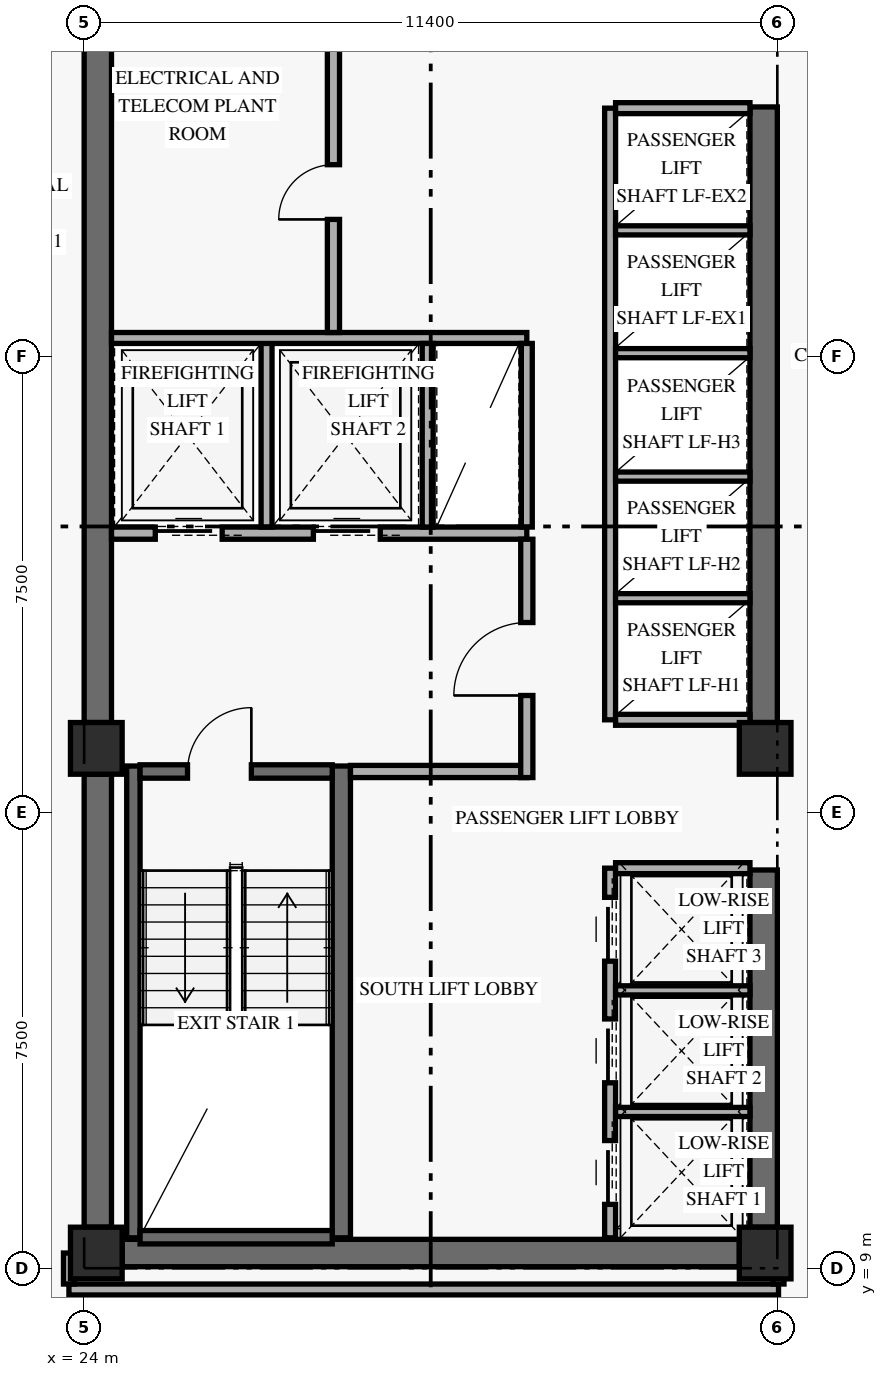
"""IFC4 building model, lengths in metres.
Left out: names, types, materials, properties, quantities, classifications, styles, units other than length and angle.
Written with IfcOpenShell. Run it as: python <this file> out.ifc"""

import sys

from ifc_helpers import new_model, si_unit, direction, frame, frame_2d, origin, origin_2d, place, context, subcontext, project, spatial, rectangle, extrude, element, fill, save


model = new_model("IFC4")
c1 = context("Model", 3, precision=1e-05, world=origin(), true_north=direction((0.0, 1.0)))
c2 = subcontext(c1, "Body", "Model", "MODEL_VIEW")
j1 = project(units=[si_unit("LENGTHUNIT", "METRE"), si_unit("PLANEANGLEUNIT", "RADIAN")], contexts=[c1])
p1 = place(None, origin())
s1 = spatial("IfcSite", under=j1, at=p1, CompositionType="ELEMENT")
p2 = place(p1, origin())
s2 = spatial("IfcBuilding", under=s1, at=p2, CompositionType="ELEMENT")
p3 = place(p2, frame((0.0, 0.0, 56.4)))
s3 = spatial("IfcBuildingStorey", under=s2, at=p3, CompositionType="ELEMENT", Elevation=56.4)
p4 = place(p3, frame((24.225, 9.675, 0.0), z_axis=(0.0, 0.0, 1.0), x_axis=(0.0, 1.0, 0.0)))
e1 = element("IfcWall", 1, at=p4, inside=s3, PredefinedType="SHEAR", context=c2, shape_type="SweptSolid", body=[
    extrude(rectangle(XDim=7.45, YDim=0.45, at=frame_2d((3.725, 0.0))), origin(), (0.0, 0.0, 1.0), 2.657),
])
p5 = place(p3, frame((24.225, 17.975, 0.0), z_axis=(0.0, 0.0, 1.0), x_axis=(0.0, 1.0, 0.0)))
e2 = element("IfcWall", 2, at=p5, inside=s3, PredefinedType="SHEAR", context=c2, shape_type="SweptSolid", body=[
    extrude(rectangle(XDim=11.8, YDim=0.45, at=frame_2d((5.9, 0.0))), origin(), (0.0, 0.0, 1.0), 2.657),
])
p6 = place(p3, frame((35.175, 9.675, 0.0), z_axis=(0.0, 0.0, 1.0), x_axis=(0.0, 1.0, 0.0)))
e3 = element("IfcWall", 3, at=p6, inside=s3, PredefinedType="SHEAR", context=c2, shape_type="SweptSolid", body=[
    extrude(rectangle(XDim=5.875, YDim=0.45, at=frame_2d((2.938, 0.0))), origin(), (0.0, 0.0, 1.0), 2.657),
])
p7 = place(p3, frame((35.175, 17.975, 0.0), z_axis=(0.0, 0.0, 1.0), x_axis=(0.0, 1.0, 0.0)))
e4 = element("IfcWall", 4, at=p7, inside=s3, PredefinedType="SHEAR", context=c2, shape_type="SweptSolid", body=[
    extrude(rectangle(XDim=10.125, YDim=0.45, at=frame_2d((5.062, 0.0))), origin(), (0.0, 0.0, 1.0), 2.657),
])
p8 = place(p3, frame((24.625, 9.25, 0.0), z_axis=(0.0, 0.0, 1.0), x_axis=(1.0, 0.0, 0.0)))
e5 = element("IfcWall", 5, at=p8, inside=s3, PredefinedType="SHEAR", context=c2, shape_type="SweptSolid", body=[
    extrude(rectangle(XDim=10.15, YDim=0.45, at=frame_2d((5.075, 0.0))), origin(), (0.0, 0.0, 1.0), 3.35),
])
p9 = place(p3, frame((24.81, 9.5, 0.0), z_axis=(0.0, 0.0, 1.0), x_axis=(0.0, 1.0, 0.0)))
e6 = element("IfcWall", 6, at=p9, inside=s3, PredefinedType="SHEAR", context=c2, shape_type="SweptSolid", body=[
    extrude(rectangle(XDim=7.76, YDim=0.22, at=frame_2d((3.88, 0.0))), origin(), (0.0, 0.0, 1.0), 3.35),
])
p10 = place(p3, frame((28.23, 9.5, 0.0), z_axis=(0.0, 0.0, 1.0), x_axis=(0.0, 1.0, 0.0)))
e7 = element("IfcWall", 7, at=p10, inside=s3, PredefinedType="SHEAR", context=c2, shape_type="SweptSolid", body=[
    extrude(rectangle(XDim=7.76, YDim=0.3, at=frame_2d((3.88, 0.0))), origin(), (0.0, 0.0, 1.0), 3.35),
])
p11 = place(p3, frame((24.92, 9.51, 0.0), z_axis=(0.0, 0.0, 1.0), x_axis=(1.0, 0.0, 0.0)))
e8 = element("IfcWall", 8, at=p11, inside=s3, PredefinedType="SHEAR", context=c2, shape_type="SweptSolid", body=[
    extrude(rectangle(XDim=3.16, YDim=0.22, at=frame_2d((1.58, 0.0))), origin(), (0.0, 0.0, 1.0), 3.35),
])
p12 = place(p3, frame((24.92, 17.17, 0.0), z_axis=(0.0, 0.0, 1.0), x_axis=(1.0, 0.0, 0.0)))
e9 = element("IfcWall", 9, at=p12, inside=s3, PredefinedType="SHEAR", context=c2, shape_type="SweptSolid", body=[
    extrude(rectangle(XDim=3.16, YDim=0.22, at=frame_2d((1.58, 0.0))), origin(), (0.0, 0.0, 1.0), 3.35),
])
p13 = place(p12, frame((0.78, 0.0, 0.0)))
e10 = element("IfcOpeningElement", 10, at=p13, cuts=e9, PredefinedType="OPENING", context=c2, shape_type="SweptSolid", body=[
    extrude(rectangle(XDim=1.05, YDim=2.15, at=frame_2d((0.525, 1.075))), frame((0.0, 0.12, 0.0), z_axis=(0.0, -1.0, 0.0), x_axis=(1.0, 0.0, 0.0)), (0.0, 0.0, 1.0), 0.24),
])
for number, where, z_axis, x_axis in (
    (11, (24.2, 9.25, 0.0), (0.0, 0.0, 1.0), (1.0, 0.0, 0.0)),
    (12, (24.2, 17.55, 0.0), (0.0, 0.0, 1.0), (1.0, 0.0, 0.0)),
    (13, (35.2, 9.25, 0.0), (0.0, 0.0, 1.0), (1.0, 0.0, 0.0)),
    (14, (35.2, 17.55, 0.0), (0.0, 0.0, 1.0), (1.0, 0.0, 0.0)),
):
    element("IfcColumn", number, at=place(p3, frame(where, z_axis=z_axis, x_axis=x_axis)), inside=s3, PredefinedType="COLUMN", context=c2, shape_type="SweptSolid", body=[
        extrude(rectangle(XDim=0.85, YDim=0.85, at=origin_2d()), origin(), (0.0, 0.0, 1.0), 3.6),
    ])
p14 = place(p3, frame((24.45, 21.09, 0.0), z_axis=(0.0, 0.0, 1.0), x_axis=(1.0, 0.0, 0.0)))
e15 = element("IfcWall", 15, at=p14, inside=s3, PredefinedType="STANDARD", context=c2, shape_type="SweptSolid", body=[
    extrude(rectangle(XDim=6.83, YDim=0.2, at=frame_2d((3.415, 0.0))), origin(), (0.0, 0.0, 1.0), 3.35),
])
p15 = place(p14, frame((0.72, 0.0, 0.0)))
e16 = element("IfcOpeningElement", 16, at=p15, cuts=e15, PredefinedType="OPENING", context=c2, shape_type="SweptSolid", body=[
    extrude(rectangle(XDim=1.1, YDim=2.2, at=frame_2d((0.55, 1.1))), frame((0.0, 0.11, 0.0), z_axis=(0.0, -1.0, 0.0), x_axis=(1.0, 0.0, 0.0)), (0.0, 0.0, 1.0), 0.22),
])
p16 = place(p14, frame((3.32, 0.0, 0.0)))
e17 = element("IfcOpeningElement", 17, at=p16, cuts=e15, PredefinedType="OPENING", context=c2, shape_type="SweptSolid", body=[
    extrude(rectangle(XDim=1.1, YDim=2.2, at=frame_2d((0.55, 1.1))), frame((0.0, 0.11, 0.0), z_axis=(0.0, -1.0, 0.0), x_axis=(1.0, 0.0, 0.0)), (0.0, 0.0, 1.0), 0.22),
])
p17 = place(p3, frame((28.38, 17.17, 0.0), z_axis=(0.0, 0.0, 1.0), x_axis=(1.0, 0.0, 0.0)))
e18 = element("IfcWall", 18, at=p17, inside=s3, PredefinedType="STANDARD", context=c2, shape_type="SweptSolid", body=[
    extrude(rectangle(XDim=2.9, YDim=0.2, at=frame_2d((1.45, 0.0))), origin(), (0.0, 0.0, 1.0), 3.35),
])
p18 = place(p3, frame((31.28, 17.07, 0.0), z_axis=(0.0, 0.0, 1.0), x_axis=(0.0, 1.0, 0.0)))
e19 = element("IfcWall", 19, at=p18, inside=s3, PredefinedType="STANDARD", context=c2, shape_type="SweptSolid", body=[
    extrude(rectangle(XDim=3.92, YDim=0.2, at=frame_2d((1.96, 0.0))), origin(), (0.0, 0.0, 1.0), 2.639),
])
p19 = place(p18, frame((1.35, 0.0, 0.0)))
e20 = element("IfcOpeningElement", 20, at=p19, cuts=e19, PredefinedType="OPENING", context=c2, shape_type="SweptSolid", body=[
    extrude(rectangle(XDim=1.2, YDim=2.15, at=frame_2d((0.6, 1.075))), frame((0.0, 0.11, 0.0), z_axis=(0.0, -1.0, 0.0), x_axis=(1.0, 0.0, 0.0)), (0.0, 0.0, 1.0), 0.22),
])
p20 = place(p3, frame((27.0, 21.19, 0.0), z_axis=(0.0, 0.0, 1.0), x_axis=(0.0, 1.0, 0.0)))
e21 = element("IfcWall", 21, at=p20, inside=s3, PredefinedType="STANDARD", context=c2, shape_type="SweptSolid", body=[
    extrude(rectangle(XDim=3.11, YDim=0.18, at=frame_2d((1.555, 0.0))), origin(), (0.0, 0.0, 1.0), 3.35),
])
p21 = place(p3, frame((24.45, 24.3, 0.0), z_axis=(0.0, 0.0, 1.0), x_axis=(1.0, 0.0, 0.0)))
e22 = element("IfcWall", 22, at=p21, inside=s3, PredefinedType="STANDARD", context=c2, shape_type="SweptSolid", body=[
    extrude(rectangle(XDim=6.83, YDim=0.18, at=frame_2d((3.415, 0.0))), origin(), (0.0, 0.0, 1.0), 3.35),
])
for number, where, z_axis, x_axis in (
    (23, (29.65, 21.19, 0.0), (0.0, 0.0, 1.0), (0.0, 1.0, 0.0)),
    (24, (31.28, 21.19, 0.0), (0.0, 0.0, 1.0), (0.0, 1.0, 0.0)),
):
    element("IfcWall", number, at=place(p3, frame(where, z_axis=z_axis, x_axis=x_axis)), inside=s3, PredefinedType="STANDARD", context=c2, shape_type="SweptSolid", body=[
        extrude(rectangle(XDim=3.02, YDim=0.18, at=frame_2d((1.51, 0.0))), origin(), (0.0, 0.0, 1.0), 3.35),
    ])
p22 = place(p3, frame((28.1, 24.39, 0.0), z_axis=(0.0, 0.0, 1.0), x_axis=(0.0, 1.0, 0.0)))
e25 = element("IfcWall", 25, at=p22, inside=s3, PredefinedType="STANDARD", context=c2, shape_type="SweptSolid", body=[
    extrude(rectangle(XDim=4.75, YDim=0.2, at=frame_2d((2.375, 0.0))), origin(), (0.0, 0.0, 1.0), 3.35),
])
p23 = place(p22, frame((1.86, 0.0, 0.0)))
e26 = element("IfcOpeningElement", 26, at=p23, cuts=e25, PredefinedType="OPENING", context=c2, shape_type="SweptSolid", body=[
    extrude(rectangle(XDim=0.9, YDim=2.1, at=frame_2d((0.45, 1.05))), frame((0.0, 0.11, 0.0), z_axis=(0.0, -1.0, 0.0), x_axis=(1.0, 0.0, 0.0)), (0.0, 0.0, 1.0), 0.22),
])
p24 = place(p3, frame((32.65, 9.5, 0.0), z_axis=(0.0, 0.0, 1.0), x_axis=(0.0, 1.0, 0.0)))
e27 = element("IfcWall", 27, at=p24, inside=s3, PredefinedType="STANDARD", context=c2, shape_type="SweptSolid", body=[
    extrude(rectangle(XDim=6.08, YDim=0.18, at=frame_2d((3.04, 0.0))), origin(), (0.0, 0.0, 1.0), 3.35),
])
p25 = place(p24, frame((0.55, 0.0, 0.0)))
e28 = element("IfcOpeningElement", 28, at=p25, cuts=e27, PredefinedType="OPENING", context=c2, shape_type="SweptSolid", body=[
    extrude(rectangle(XDim=1.05, YDim=2.2, at=frame_2d((0.525, 1.1))), frame((0.0, 0.1, 0.0), z_axis=(0.0, -1.0, 0.0), x_axis=(1.0, 0.0, 0.0)), (0.0, 0.0, 1.0), 0.2),
])
p26 = place(p24, frame((2.55, 0.0, 0.0)))
e29 = element("IfcOpeningElement", 29, at=p26, cuts=e27, PredefinedType="OPENING", context=c2, shape_type="SweptSolid", body=[
    extrude(rectangle(XDim=1.05, YDim=2.2, at=frame_2d((0.525, 1.1))), frame((0.0, 0.1, 0.0), z_axis=(0.0, -1.0, 0.0), x_axis=(1.0, 0.0, 0.0)), (0.0, 0.0, 1.0), 0.2),
])
p27 = place(p24, frame((4.55, 0.0, 0.0)))
e30 = element("IfcOpeningElement", 30, at=p27, cuts=e27, PredefinedType="OPENING", context=c2, shape_type="SweptSolid", body=[
    extrude(rectangle(XDim=1.05, YDim=2.2, at=frame_2d((0.525, 1.1))), frame((0.0, 0.1, 0.0), z_axis=(0.0, -1.0, 0.0), x_axis=(1.0, 0.0, 0.0)), (0.0, 0.0, 1.0), 0.2),
])
p28 = place(p3, frame((32.74, 15.58, 0.0), z_axis=(0.0, 0.0, 1.0), x_axis=(1.0, 0.0, 0.0)))
e31 = element("IfcWall", 31, at=p28, inside=s3, PredefinedType="STANDARD", context=c2, shape_type="SweptSolid", body=[
    extrude(rectangle(XDim=2.21, YDim=0.18, at=frame_2d((1.105, 0.0))), origin(), (0.0, 0.0, 1.0), 3.35),
])
for number, where, z_axis, x_axis in (
    (32, (32.74, 11.57, 0.0), (0.0, 0.0, 1.0), (1.0, 0.0, 0.0)),
    (33, (32.74, 13.57, 0.0), (0.0, 0.0, 1.0), (1.0, 0.0, 0.0)),
):
    element("IfcWall", number, at=place(p3, frame(where, z_axis=z_axis, x_axis=x_axis)), inside=s3, PredefinedType="STANDARD", context=c2, shape_type="SweptSolid", body=[
        extrude(rectangle(XDim=2.21, YDim=0.15, at=frame_2d((1.105, 0.0))), origin(), (0.0, 0.0, 1.0), 3.35),
    ])
p29 = place(p3, frame((32.65, 18.02, 0.0), z_axis=(0.0, 0.0, 1.0), x_axis=(0.0, 1.0, 0.0)))
e34 = element("IfcWall", 34, at=p29, inside=s3, PredefinedType="STANDARD", context=c2, shape_type="SweptSolid", body=[
    extrude(rectangle(XDim=10.06, YDim=0.18, at=frame_2d((5.03, 0.0))), origin(), (0.0, 0.0, 1.0), 3.35),
])
for number, where, z_axis, x_axis in (
    (35, (32.74, 18.02, 0.0), (0.0, 0.0, 1.0), (1.0, 0.0, 0.0)),
    (36, (32.74, 28.08, 0.0), (0.0, 0.0, 1.0), (1.0, 0.0, 0.0)),
):
    element("IfcWall", number, at=place(p3, frame(where, z_axis=z_axis, x_axis=x_axis)), inside=s3, PredefinedType="STANDARD", context=c2, shape_type="SweptSolid", body=[
        extrude(rectangle(XDim=2.21, YDim=0.18, at=frame_2d((1.105, 0.0))), origin(), (0.0, 0.0, 1.0), 3.35),
    ])
for number, where, z_axis, x_axis in (
    (37, (32.74, 20.02, 0.0), (0.0, 0.0, 1.0), (1.0, 0.0, 0.0)),
    (38, (32.74, 22.02, 0.0), (0.0, 0.0, 1.0), (1.0, 0.0, 0.0)),
    (39, (32.74, 24.05, 0.0), (0.0, 0.0, 1.0), (1.0, 0.0, 0.0)),
    (40, (32.74, 26.07, 0.0), (0.0, 0.0, 1.0), (1.0, 0.0, 0.0)),
):
    element("IfcWall", number, at=place(p3, frame(where, z_axis=z_axis, x_axis=x_axis)), inside=s3, PredefinedType="STANDARD", context=c2, shape_type="SweptSolid", body=[
        extrude(rectangle(XDim=2.21, YDim=0.15, at=frame_2d((1.105, 0.0))), origin(), (0.0, 0.0, 1.0), 3.35),
    ])
p30 = place(p3, frame((23.75, 8.65, 0.0), z_axis=(0.0, 0.0, 1.0), x_axis=(1.0, 0.0, 0.0)))
e41 = element("IfcWall", 41, at=p30, inside=s3, PredefinedType="STANDARD", context=c2, shape_type="SweptSolid", body=[
    extrude(rectangle(XDim=11.67, YDim=0.18, at=frame_2d((5.835, 0.0))), origin(), (0.0, 0.0, 1.0), 2.639),
])
p31 = place(p3, frame((35.42, 8.74, 0.0), z_axis=(0.0, 0.0, 1.0), x_axis=(0.0, 1.0, 0.0)))
e42 = element("IfcWall", 42, at=p31, inside=s3, PredefinedType="STANDARD", context=c2, shape_type="SweptSolid", body=[
    extrude(rectangle(XDim=0.51, YDim=0.18, at=frame_2d((0.255, 0.0))), origin(), (0.0, 0.0, 1.0), 3.35),
])
p32 = place(p3, frame((23.75, 8.74, 0.0), z_axis=(0.0, 0.0, 1.0), x_axis=(0.0, 1.0, 0.0)))
e43 = element("IfcWall", 43, at=p32, inside=s3, PredefinedType="STANDARD", context=c2, shape_type="SweptSolid", body=[
    extrude(rectangle(XDim=0.51, YDim=0.18, at=frame_2d((0.255, 0.0))), origin(), (0.0, 0.0, 1.0), 2.639),
])
p33 = place(p13, frame((1.05, 0.0, 0.0), z_axis=(0.0, 0.0, 1.0), x_axis=(-1.0, 0.0, 0.0)))
e44 = element("IfcDoor", 44, at=p33, inside=s3, OperationType="SINGLE_SWING_LEFT", PredefinedType="DOOR", context=c2, shape_type="SweptSolid", body=[
    extrude(rectangle(XDim=1.05, YDim=2.15, at=frame_2d((0.525, 1.075))), frame((0.0, 0.025, 0.0), z_axis=(0.0, -1.0, 0.0), x_axis=(1.0, 0.0, 0.0)), (0.0, 0.0, 1.0), 0.05),
])
fill(e10, e44)
p34 = place(p15, origin())
e45 = element("IfcDoor", 45, at=p34, inside=s3, OperationType="SLIDING_TO_LEFT", PredefinedType="DOOR", context=c2, shape_type="SweptSolid", body=[
    extrude(rectangle(XDim=1.1, YDim=2.2, at=frame_2d((0.55, 1.1))), frame((0.0, 0.025, 0.0), z_axis=(0.0, -1.0, 0.0), x_axis=(1.0, 0.0, 0.0)), (0.0, 0.0, 1.0), 0.05),
])
fill(e16, e45)
p35 = place(p16, origin())
e46 = element("IfcDoor", 46, at=p35, inside=s3, OperationType="SLIDING_TO_LEFT", PredefinedType="DOOR", context=c2, shape_type="SweptSolid", body=[
    extrude(rectangle(XDim=1.1, YDim=2.2, at=frame_2d((0.55, 1.1))), frame((0.0, 0.025, 0.0), z_axis=(0.0, -1.0, 0.0), x_axis=(1.0, 0.0, 0.0)), (0.0, 0.0, 1.0), 0.05),
])
fill(e17, e46)
p36 = place(p19, origin())
e47 = element("IfcDoor", 47, at=p36, inside=s3, OperationType="SINGLE_SWING_LEFT", PredefinedType="DOOR", context=c2, shape_type="SweptSolid", body=[
    extrude(rectangle(XDim=1.2, YDim=2.15, at=frame_2d((0.6, 1.075))), frame((0.0, 0.025, 0.0), z_axis=(0.0, -1.0, 0.0), x_axis=(1.0, 0.0, 0.0)), (0.0, 0.0, 1.0), 0.05),
])
fill(e20, e47)
p37 = place(p23, origin())
e48 = element("IfcDoor", 48, at=p37, inside=s3, OperationType="SINGLE_SWING_LEFT", PredefinedType="DOOR", context=c2, shape_type="SweptSolid", body=[
    extrude(rectangle(XDim=0.9, YDim=2.1, at=frame_2d((0.45, 1.05))), frame((0.0, 0.025, 0.0), z_axis=(0.0, -1.0, 0.0), x_axis=(1.0, 0.0, 0.0)), (0.0, 0.0, 1.0), 0.05),
])
fill(e26, e48)
p38 = place(p25, origin())
e49 = element("IfcDoor", 49, at=p38, inside=s3, OperationType="SLIDING_TO_LEFT", PredefinedType="DOOR", context=c2, shape_type="SweptSolid", body=[
    extrude(rectangle(XDim=1.05, YDim=2.2, at=frame_2d((0.525, 1.1))), frame((0.0, 0.025, 0.0), z_axis=(0.0, -1.0, 0.0), x_axis=(1.0, 0.0, 0.0)), (0.0, 0.0, 1.0), 0.05),
])
fill(e28, e49)
p39 = place(p26, origin())
e50 = element("IfcDoor", 50, at=p39, inside=s3, OperationType="SLIDING_TO_LEFT", PredefinedType="DOOR", context=c2, shape_type="SweptSolid", body=[
    extrude(rectangle(XDim=1.05, YDim=2.2, at=frame_2d((0.525, 1.1))), frame((0.0, 0.025, 0.0), z_axis=(0.0, -1.0, 0.0), x_axis=(1.0, 0.0, 0.0)), (0.0, 0.0, 1.0), 0.05),
])
fill(e29, e50)
p40 = place(p27, origin())
e51 = element("IfcDoor", 51, at=p40, inside=s3, OperationType="SLIDING_TO_LEFT", PredefinedType="DOOR", context=c2, shape_type="SweptSolid", body=[
    extrude(rectangle(XDim=1.05, YDim=2.2, at=frame_2d((0.525, 1.1))), frame((0.0, 0.025, 0.0), z_axis=(0.0, -1.0, 0.0), x_axis=(1.0, 0.0, 0.0)), (0.0, 0.0, 1.0), 0.05),
])
fill(e30, e51)
save(model, sys.argv[1])
